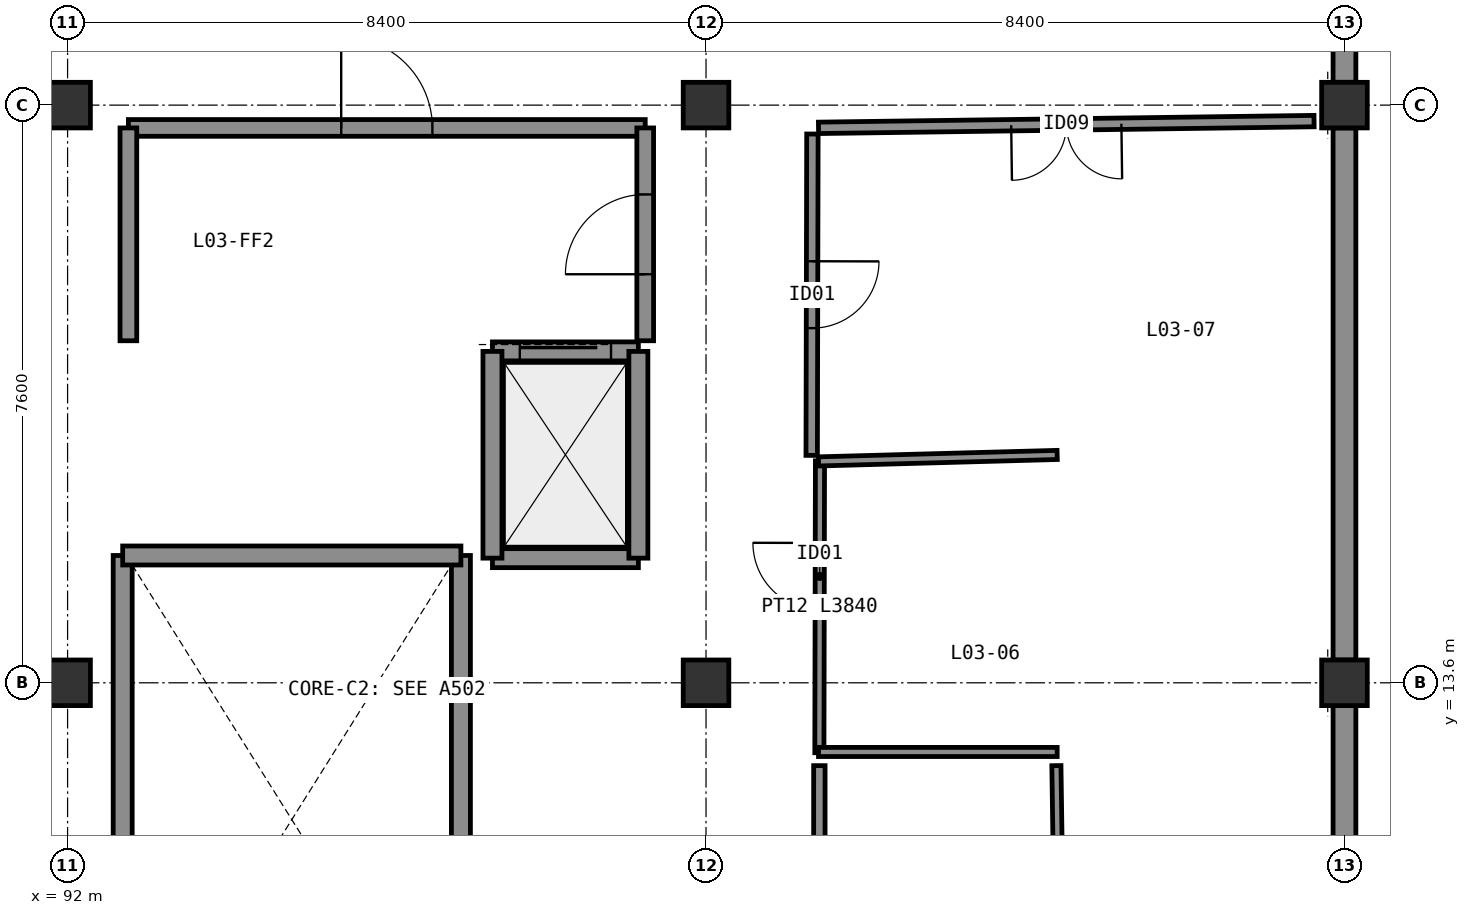
"""IFC4 building model, lengths in metres.
Left out: names, types, materials, properties, quantities, classifications, styles, units other than length and angle.
Written with IfcOpenShell. Run it as: python <this file> out.ifc"""

import sys

from ifc_helpers import new_model, si_unit, direction, frame, frame_2d, origin, origin_2d, place, context, subcontext, project, spatial, rectangle, extrude, element, fill, save


model = new_model("IFC4")
c1 = context("Model", 3, precision=1e-05, world=origin(), true_north=direction((0.0, 1.0)))
c2 = subcontext(c1, "Body", "Model", "MODEL_VIEW")
j1 = project(units=[si_unit("LENGTHUNIT", "METRE"), si_unit("PLANEANGLEUNIT", "RADIAN")], contexts=[c1])
p1 = place(None, origin())
s1 = spatial("IfcSite", under=j1, at=p1, CompositionType="ELEMENT")
p2 = place(p1, origin())
s2 = spatial("IfcBuilding", under=s1, at=p2, CompositionType="ELEMENT")
p3 = place(p2, frame((0.0, 0.0, 13.8)))
s3 = spatial("IfcBuildingStorey", under=s2, at=p3, CompositionType="ELEMENT", Elevation=13.8)
for number, where, z_axis, x_axis in (
    (1, (92.0, 13.6, 0.0), (0.0, 0.0, 1.0), (1.0, 0.0, 0.0)),
    (2, (100.4, 13.6, 0.0), (0.0, 0.0, 1.0), (1.0, 0.0, 0.0)),
    (3, (108.8, 13.6, 0.0), (0.0, 0.0, 1.0), (1.0, 0.0, 0.0)),
    (4, (92.0, 21.2, 0.0), (0.0, 0.0, 1.0), (1.0, 0.0, 0.0)),
    (5, (100.4, 21.2, 0.0), (0.0, 0.0, 1.0), (1.0, 0.0, 0.0)),
    (6, (108.8, 21.2, 0.0), (0.0, 0.0, 1.0), (1.0, 0.0, 0.0)),
):
    element("IfcColumn", number, at=place(p3, frame(where, z_axis=z_axis, x_axis=x_axis)), inside=s3, PredefinedType="COLUMN", context=c2, shape_type="SweptSolid", body=[
        extrude(rectangle(XDim=0.6, YDim=0.6, at=origin_2d()), origin(), (0.0, 0.0, 1.0), 4.2),
    ])
for number, where, z_axis, x_axis in (
    (7, (108.8, 6.3, 0.0), (0.0, 0.0, 1.0), (0.0, 1.0, 0.0)),
    (8, (108.8, 13.9, 0.0), (0.0, 0.0, 1.0), (0.0, 1.0, 0.0)),
    (9, (108.8, 21.5, 0.0), (0.0, 0.0, 1.0), (0.0, 1.0, 0.0)),
):
    element("IfcWall", number, at=place(p3, frame(where, z_axis=z_axis, x_axis=x_axis)), inside=s3, PredefinedType="SOLIDWALL", context=c2, shape_type="SweptSolid", body=[
        extrude(rectangle(XDim=7.0, YDim=0.3, at=frame_2d((3.5, 0.0))), origin(), (0.0, 0.0, 1.0), 3.135),
    ])
p4 = place(p3, frame((92.725, 6.225, 0.0), z_axis=(0.0, 0.0, 1.0), x_axis=(0.0, 1.0, 0.0)))
e10 = element("IfcWall", 10, at=p4, inside=s3, PredefinedType="SHEAR", context=c2, shape_type="SweptSolid", body=[
    extrude(rectangle(XDim=9.05, YDim=0.25, at=frame_2d((4.525, 0.0))), origin(), (0.0, 0.0, 1.0), 3.96),
])
p5 = place(p3, frame((97.175, 6.225, 0.0), z_axis=(0.0, 0.0, 1.0), x_axis=(0.0, 1.0, 0.0)))
e11 = element("IfcWall", 11, at=p5, inside=s3, PredefinedType="SHEAR", context=c2, shape_type="SweptSolid", body=[
    extrude(rectangle(XDim=9.05, YDim=0.25, at=frame_2d((4.525, 0.0))), origin(), (0.0, 0.0, 1.0), 3.96),
])
p6 = place(p5, frame((0.55, 0.0, 0.0)))
e12 = element("IfcOpeningElement", 12, at=p6, cuts=e11, PredefinedType="OPENING", context=c2, shape_type="SweptSolid", body=[
    extrude(rectangle(XDim=1.05, YDim=2.1, at=frame_2d((0.525, 1.05))), frame((0.0, 0.135, 0.0), z_axis=(0.0, -1.0, 0.0), x_axis=(1.0, 0.0, 0.0)), (0.0, 0.0, 1.0), 0.27),
])
p7 = place(p3, frame((92.725, 15.275, 0.0), z_axis=(0.0, 0.0, 1.0), x_axis=(1.0, 0.0, 0.0)))
e13 = element("IfcWall", 13, at=p7, inside=s3, PredefinedType="SHEAR", context=c2, shape_type="SweptSolid", body=[
    extrude(rectangle(XDim=4.45, YDim=0.25, at=frame_2d((2.225, 0.0))), origin(), (0.0, 0.0, 1.0), 3.96),
])
p8 = place(p3, frame((92.8, 20.9, 0.0), z_axis=(0.0, 0.0, 1.0), x_axis=(1.0, 0.0, 0.0)))
e14 = element("IfcWall", 14, at=p8, inside=s3, PredefinedType="SOLIDWALL", context=c2, shape_type="SweptSolid", body=[
    extrude(rectangle(XDim=6.8, YDim=0.22, at=frame_2d((3.4, 0.0))), origin(), (0.0, 0.0, 1.0), 3.95),
])
p9 = place(p8, frame((2.8, 0.0, 0.0)))
e15 = element("IfcOpeningElement", 15, at=p9, cuts=e14, PredefinedType="OPENING", context=c2, shape_type="SweptSolid", body=[
    extrude(rectangle(XDim=1.2, YDim=2.1, at=frame_2d((0.6, 1.05))), frame((0.0, 0.12, 0.0), z_axis=(0.0, -1.0, 0.0), x_axis=(1.0, 0.0, 0.0)), (0.0, 0.0, 1.0), 0.24),
])
p10 = place(p3, frame((92.8, 18.1, 0.0), z_axis=(0.0, 0.0, 1.0), x_axis=(0.0, 1.0, 0.0)))
e16 = element("IfcWall", 16, at=p10, inside=s3, PredefinedType="SOLIDWALL", context=c2, shape_type="SweptSolid", body=[
    extrude(rectangle(XDim=2.8, YDim=0.22, at=frame_2d((1.4, 0.0))), origin(), (0.0, 0.0, 1.0), 3.95),
])
p11 = place(p3, frame((99.6, 18.1, 0.0), z_axis=(0.0, 0.0, 1.0), x_axis=(0.0, 1.0, 0.0)))
e17 = element("IfcWall", 17, at=p11, inside=s3, PredefinedType="SOLIDWALL", context=c2, shape_type="SweptSolid", body=[
    extrude(rectangle(XDim=2.8, YDim=0.22, at=frame_2d((1.4, 0.0))), origin(), (0.0, 0.0, 1.0), 3.95),
])
p12 = place(p11, frame((0.875, 0.0, 0.0)))
e18 = element("IfcOpeningElement", 18, at=p12, cuts=e17, PredefinedType="OPENING", context=c2, shape_type="SweptSolid", body=[
    extrude(rectangle(XDim=1.05, YDim=2.1, at=frame_2d((0.525, 1.05))), frame((0.0, 0.12, 0.0), z_axis=(0.0, -1.0, 0.0), x_axis=(1.0, 0.0, 0.0)), (0.0, 0.0, 1.0), 0.24),
])
p13 = place(p3, frame((97.59, 15.24, 0.0), z_axis=(0.0, 0.0, 1.0), x_axis=(1.0, 0.0, 0.0)))
e19 = element("IfcWall", 19, at=p13, inside=s3, PredefinedType="SHEAR", context=c2, shape_type="SweptSolid", body=[
    extrude(rectangle(XDim=1.92, YDim=0.25, at=frame_2d((0.96, 0.0))), origin(), (0.0, 0.0, 1.0), 3.96),
])
p14 = place(p3, frame((97.59, 17.96, 0.0), z_axis=(0.0, 0.0, 1.0), x_axis=(1.0, 0.0, 0.0)))
e20 = element("IfcWall", 20, at=p14, inside=s3, PredefinedType="SHEAR", context=c2, shape_type="SweptSolid", body=[
    extrude(rectangle(XDim=1.92, YDim=0.25, at=frame_2d((0.96, 0.0))), origin(), (0.0, 0.0, 1.0), 3.96),
])
p15 = place(p14, frame((0.36, 0.0, 0.0)))
e21 = element("IfcOpeningElement", 21, at=p15, cuts=e20, PredefinedType="OPENING", context=c2, shape_type="SweptSolid", body=[
    extrude(rectangle(XDim=1.2, YDim=2.2, at=frame_2d((0.6, 1.1))), frame((0.0, 0.135, 0.0), z_axis=(0.0, -1.0, 0.0), x_axis=(1.0, 0.0, 0.0)), (0.0, 0.0, 1.0), 0.27),
])
for number, where, z_axis, x_axis in (
    (22, (97.59, 15.24, 0.0), (0.0, 0.0, 1.0), (0.0, 1.0, 0.0)),
    (23, (99.51, 15.24, 0.0), (0.0, 0.0, 1.0), (0.0, 1.0, 0.0)),
):
    element("IfcWall", number, at=place(p3, frame(where, z_axis=z_axis, x_axis=x_axis)), inside=s3, PredefinedType="SHEAR", context=c2, shape_type="SweptSolid", body=[
        extrude(rectangle(XDim=2.72, YDim=0.25, at=frame_2d((1.36, 0.0))), origin(), (0.0, 0.0, 1.0), 3.96),
    ])
p16 = place(p3, frame((101.891, 12.68, 0.0), z_axis=(0.0, 0.0, 1.0), x_axis=(0.002098030858, 0.999997799131, 0.0)))
e24 = element("IfcWall", 24, at=p16, inside=s3, PredefinedType="PARTITIONING", context=c2, shape_type="SweptSolid", body=[
    extrude(rectangle(XDim=3.84, YDim=0.12, at=frame_2d((1.92, 0.0))), origin(), (0.0, 0.0, 1.0), 3.95),
])
p17 = place(p16, frame((1.88, 0.0, 0.0)))
e25 = element("IfcOpeningElement", 25, at=p17, cuts=e24, PredefinedType="OPENING", context=c2, shape_type="SweptSolid", body=[
    extrude(rectangle(XDim=0.88, YDim=2.08, at=frame_2d((0.44, 1.04))), frame((0.0, 0.07, 0.0), z_axis=(0.0, -1.0, 0.0), x_axis=(1.0, 0.0, 0.0)), (0.0, 0.0, 1.0), 0.14),
])
p18 = place(p3, frame((101.89, 6.4, 0.0), z_axis=(0.0, 0.0, 1.0), x_axis=(0.000239741073, 0.999999971262, 0.0)))
e26 = element("IfcWall", 26, at=p18, inside=s3, PredefinedType="PARTITIONING", context=c2, shape_type="SweptSolid", body=[
    extrude(rectangle(XDim=6.11, YDim=0.15, at=frame_2d((3.055, 0.0))), origin(), (0.0, 0.0, 1.0), 3.95),
])
p19 = place(p18, frame((2.38, 0.0, 0.0)))
e27 = element("IfcOpeningElement", 27, at=p19, cuts=e26, PredefinedType="OPENING", context=c2, shape_type="SweptSolid", body=[
    extrude(rectangle(XDim=1.35, YDim=2.18, at=frame_2d((0.675, 1.09))), frame((0.0, 0.085, 0.0), z_axis=(0.0, -1.0, 0.0), x_axis=(1.0, 0.0, 0.0)), (0.0, 0.0, 1.0), 0.17),
])
p20 = place(p3, frame((108.4, 20.99, 0.0), z_axis=(0.0, 0.0, 1.0), x_axis=(-0.999907125909, -0.013628630039, 0.0)))
e28 = element("IfcWall", 28, at=p20, inside=s3, PredefinedType="PARTITIONING", context=c2, shape_type="SweptSolid", body=[
    extrude(rectangle(XDim=6.521, YDim=0.15, at=frame_2d((3.26, 0.0))), origin(), (0.0, 0.0, 1.0), 3.95),
])
p21 = place(p20, frame((2.535, 0.0, 0.0)))
e29 = element("IfcOpeningElement", 29, at=p21, cuts=e28, PredefinedType="OPENING", context=c2, shape_type="SweptSolid", body=[
    extrude(rectangle(XDim=1.45, YDim=2.18, at=frame_2d((0.725, 1.09))), frame((0.0, 0.085, 0.0), z_axis=(0.0, -1.0, 0.0), x_axis=(1.0, 0.0, 0.0)), (0.0, 0.0, 1.0), 0.17),
])
p22 = place(p3, frame((101.8, 20.82, 0.0), z_axis=(0.0, 0.0, 1.0), x_axis=(-0.002251986436, -0.999997464275, 0.0)))
e30 = element("IfcWall", 30, at=p22, inside=s3, PredefinedType="PARTITIONING", context=c2, shape_type="SweptSolid", body=[
    extrude(rectangle(XDim=4.228, YDim=0.15, at=frame_2d((2.114, 0.0))), origin(), (0.0, 0.0, 1.0), 3.95),
])
p23 = place(p22, frame((1.674, 0.0, 0.0)))
e31 = element("IfcOpeningElement", 31, at=p23, cuts=e30, PredefinedType="OPENING", context=c2, shape_type="SweptSolid", body=[
    extrude(rectangle(XDim=0.88, YDim=2.08, at=frame_2d((0.44, 1.04))), frame((0.0, 0.085, 0.0), z_axis=(0.0, -1.0, 0.0), x_axis=(1.0, 0.0, 0.0)), (0.0, 0.0, 1.0), 0.17),
])
p24 = place(p3, frame((105.02, 12.69, 0.0), z_axis=(0.0, 0.0, 1.0), x_axis=(-1.0, 0.0, 0.0)))
e32 = element("IfcWall", 32, at=p24, inside=s3, PredefinedType="PARTITIONING", context=c2, shape_type="SweptSolid", body=[
    extrude(rectangle(XDim=3.14, YDim=0.12, at=frame_2d((1.57, 0.0))), origin(), (0.0, 0.0, 1.0), 3.95),
])
p25 = place(p3, frame((101.88, 16.513, 0.0), z_axis=(0.0, 0.0, 1.0), x_axis=(0.999632070922, 0.02712421029, 0.0)))
e33 = element("IfcWall", 33, at=p25, inside=s3, PredefinedType="PARTITIONING", context=c2, shape_type="SweptSolid", body=[
    extrude(rectangle(XDim=3.141, YDim=0.12, at=frame_2d((1.571, 0.0))), origin(), (0.0, 0.0, 1.0), 3.95),
])
p26 = place(p3, frame((105.01, 12.51, 0.0), z_axis=(0.0, 0.0, 1.0), x_axis=(0.014742474068, -0.999891323824, 0.0)))
e34 = element("IfcWall", 34, at=p26, inside=s3, PredefinedType="PARTITIONING", context=c2, shape_type="SweptSolid", body=[
    extrude(rectangle(XDim=6.111, YDim=0.12, at=frame_2d((3.055, 0.0))), origin(), (0.0, 0.0, 1.0), 3.95),
])
p27 = place(p26, frame((2.48, 0.0, 0.0)))
e35 = element("IfcOpeningElement", 35, at=p27, cuts=e34, PredefinedType="OPENING", context=c2, shape_type="SweptSolid", body=[
    extrude(rectangle(XDim=1.15, YDim=2.12, at=frame_2d((0.575, 1.06))), frame((0.0, 0.07, 0.0), z_axis=(0.0, -1.0, 0.0), x_axis=(1.0, 0.0, 0.0)), (0.0, 0.0, 1.0), 0.14),
])
p28 = place(p9, origin())
e36 = element("IfcDoor", 36, at=p28, inside=s3, OperationType="SINGLE_SWING_LEFT", PredefinedType="DOOR", context=c2, shape_type="SweptSolid", body=[
    extrude(rectangle(XDim=1.2, YDim=2.1, at=frame_2d((0.6, 1.05))), frame((0.0, 0.025, 0.0), z_axis=(0.0, -1.0, 0.0), x_axis=(1.0, 0.0, 0.0)), (0.0, 0.0, 1.0), 0.05),
])
fill(e15, e36)
p29 = place(p12, origin())
e37 = element("IfcDoor", 37, at=p29, inside=s3, OperationType="SINGLE_SWING_LEFT", PredefinedType="DOOR", context=c2, shape_type="SweptSolid", body=[
    extrude(rectangle(XDim=1.05, YDim=2.1, at=frame_2d((0.525, 1.05))), frame((0.0, 0.025, 0.0), z_axis=(0.0, -1.0, 0.0), x_axis=(1.0, 0.0, 0.0)), (0.0, 0.0, 1.0), 0.05),
])
fill(e18, e37)
p30 = place(p15, origin())
e38 = element("IfcDoor", 38, at=p30, inside=s3, OperationType="SLIDING_TO_LEFT", PredefinedType="DOOR", context=c2, shape_type="SweptSolid", body=[
    extrude(rectangle(XDim=1.2, YDim=2.2, at=frame_2d((0.6, 1.1))), frame((0.0, 0.025, 0.0), z_axis=(0.0, -1.0, 0.0), x_axis=(1.0, 0.0, 0.0)), (0.0, 0.0, 1.0), 0.05),
])
fill(e21, e38)
p31 = place(p17, origin())
e39 = element("IfcDoor", 39, at=p31, inside=s3, OperationType="SINGLE_SWING_RIGHT", PredefinedType="DOOR", context=c2, shape_type="SweptSolid", body=[
    extrude(rectangle(XDim=0.88, YDim=2.08, at=frame_2d((0.44, 1.04))), frame((0.0, 0.025, 0.0), z_axis=(0.0, -1.0, 0.0), x_axis=(1.0, 0.0, 0.0)), (0.0, 0.0, 1.0), 0.05),
])
fill(e25, e39)
p32 = place(p21, origin())
e40 = element("IfcDoor", 40, at=p32, inside=s3, OperationType="DOUBLE_DOOR_SINGLE_SWING", PredefinedType="DOOR", context=c2, shape_type="SweptSolid", body=[
    extrude(rectangle(XDim=1.45, YDim=2.18, at=frame_2d((0.725, 1.09))), frame((0.0, 0.025, 0.0), z_axis=(0.0, -1.0, 0.0), x_axis=(1.0, 0.0, 0.0)), (0.0, 0.0, 1.0), 0.05),
])
fill(e29, e40)
p33 = place(p23, origin())
e41 = element("IfcDoor", 41, at=p33, inside=s3, OperationType="SINGLE_SWING_LEFT", PredefinedType="DOOR", context=c2, shape_type="SweptSolid", body=[
    extrude(rectangle(XDim=0.88, YDim=2.08, at=frame_2d((0.44, 1.04))), frame((0.0, 0.025, 0.0), z_axis=(0.0, -1.0, 0.0), x_axis=(1.0, 0.0, 0.0)), (0.0, 0.0, 1.0), 0.05),
])
fill(e31, e41)
save(model, sys.argv[1])
